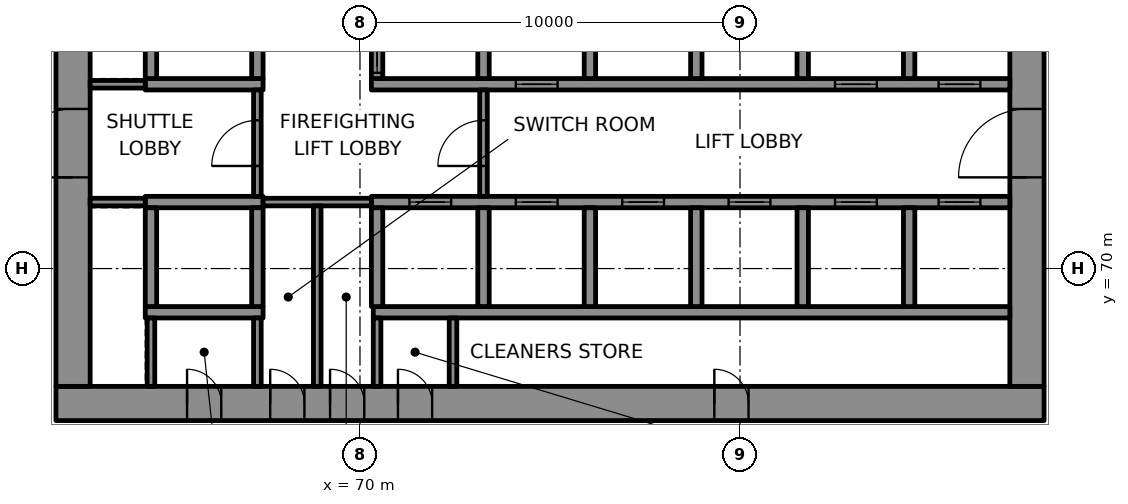
"""IFC4 building model, lengths in metres.
Left out: names, types, materials, properties, quantities, classifications, styles, units other than length and angle.
Written with IfcOpenShell. Run it as: python <this file> out.ifc"""

import sys

from ifc_helpers import new_model, si_unit, direction, frame, frame_2d, origin, place, context, subcontext, project, spatial, rectangle, extrude, element, fill, save


model = new_model("IFC4")
c1 = context("Model", 3, precision=1e-05, world=origin(), true_north=direction((0.0, 1.0)))
c2 = subcontext(c1, "Body", "Model", "MODEL_VIEW")
j1 = project(units=[si_unit("LENGTHUNIT", "METRE"), si_unit("PLANEANGLEUNIT", "RADIAN")], contexts=[c1])
p1 = place(None, origin())
s1 = spatial("IfcSite", under=j1, at=p1, CompositionType="ELEMENT")
p2 = place(p1, origin())
s2 = spatial("IfcBuilding", under=s1, at=p2, CompositionType="ELEMENT")
p3 = place(p2, frame((0.0, 0.0, 73.6)))
s3 = spatial("IfcBuildingStorey", under=s2, at=p3, CompositionType="ELEMENT", Elevation=73.6)
p4 = place(p3, frame((62.0, 66.45, 0.0), z_axis=(0.0, 0.0, 1.0), x_axis=(1.0, 0.0, 0.0)))
e1 = element("IfcWall", 1, at=p4, inside=s3, PredefinedType="SHEAR", context=c2, shape_type="SweptSolid", body=[
    extrude(rectangle(XDim=26.0, YDim=0.9, at=frame_2d((13.0, 0.0))), origin(), (0.0, 0.0, 1.0), 4.0),
])
p5 = place(p4, frame((3.45, 0.0, 0.0)))
e2 = element("IfcOpeningElement", 2, at=p5, cuts=e1, PredefinedType="OPENING", context=c2, shape_type="SweptSolid", body=[
    extrude(rectangle(XDim=0.9, YDim=2.1, at=frame_2d((0.45, 1.05))), frame((0.0, 0.46, 0.0), z_axis=(0.0, -1.0, 0.0), x_axis=(1.0, 0.0, 0.0)), (0.0, 0.0, 1.0), 0.92),
])
p6 = place(p4, frame((5.637, 0.0, 0.0)))
e3 = element("IfcOpeningElement", 3, at=p6, cuts=e1, PredefinedType="OPENING", context=c2, shape_type="SweptSolid", body=[
    extrude(rectangle(XDim=0.9, YDim=2.1, at=frame_2d((0.45, 1.05))), frame((0.0, 0.46, 0.0), z_axis=(0.0, -1.0, 0.0), x_axis=(1.0, 0.0, 0.0)), (0.0, 0.0, 1.0), 0.92),
])
p7 = place(p4, frame((7.212, 0.0, 0.0)))
e4 = element("IfcOpeningElement", 4, at=p7, cuts=e1, PredefinedType="OPENING", context=c2, shape_type="SweptSolid", body=[
    extrude(rectangle(XDim=0.9, YDim=2.1, at=frame_2d((0.45, 1.05))), frame((0.0, 0.46, 0.0), z_axis=(0.0, -1.0, 0.0), x_axis=(1.0, 0.0, 0.0)), (0.0, 0.0, 1.0), 0.92),
])
p8 = place(p4, frame((8.999, 0.0, 0.0)))
e5 = element("IfcOpeningElement", 5, at=p8, cuts=e1, PredefinedType="OPENING", context=c2, shape_type="SweptSolid", body=[
    extrude(rectangle(XDim=0.9, YDim=2.1, at=frame_2d((0.45, 1.05))), frame((0.0, 0.46, 0.0), z_axis=(0.0, -1.0, 0.0), x_axis=(1.0, 0.0, 0.0)), (0.0, 0.0, 1.0), 0.92),
])
p9 = place(p4, frame((17.324, 0.0, 0.0)))
e6 = element("IfcOpeningElement", 6, at=p9, cuts=e1, PredefinedType="OPENING", context=c2, shape_type="SweptSolid", body=[
    extrude(rectangle(XDim=0.9, YDim=2.1, at=frame_2d((0.45, 1.05))), frame((0.0, 0.46, 0.0), z_axis=(0.0, -1.0, 0.0), x_axis=(1.0, 0.0, 0.0)), (0.0, 0.0, 1.0), 0.92),
])
p10 = place(p3, frame((62.45, 66.9, 0.0), z_axis=(0.0, 0.0, 1.0), x_axis=(0.0, 1.0, 0.0)))
e7 = element("IfcWall", 7, at=p10, inside=s3, PredefinedType="SHEAR", context=c2, shape_type="SweptSolid", body=[
    extrude(rectangle(XDim=16.2, YDim=0.9, at=frame_2d((8.1, 0.0))), origin(), (0.0, 0.0, 1.0), 4.0),
])
p11 = place(p10, frame((5.5, 0.0, 0.0)))
e8 = element("IfcOpeningElement", 8, at=p11, cuts=e7, PredefinedType="OPENING", context=c2, shape_type="SweptSolid", body=[
    extrude(rectangle(XDim=1.8, YDim=2.1, at=frame_2d((0.9, 1.05))), frame((0.0, 0.46, 0.0), z_axis=(0.0, -1.0, 0.0), x_axis=(1.0, 0.0, 0.0)), (0.0, 0.0, 1.0), 0.92),
])
p12 = place(p3, frame((87.55, 66.9, 0.0), z_axis=(0.0, 0.0, 1.0), x_axis=(0.0, 1.0, 0.0)))
e9 = element("IfcWall", 9, at=p12, inside=s3, PredefinedType="SHEAR", context=c2, shape_type="SweptSolid", body=[
    extrude(rectangle(XDim=16.2, YDim=0.9, at=frame_2d((8.1, 0.0))), origin(), (0.0, 0.0, 1.0), 4.0),
])
p13 = place(p12, frame((5.5, 0.0, 0.0)))
e10 = element("IfcOpeningElement", 10, at=p13, cuts=e9, PredefinedType="OPENING", context=c2, shape_type="SweptSolid", body=[
    extrude(rectangle(XDim=1.8, YDim=2.1, at=frame_2d((0.9, 1.05))), frame((0.0, 0.46, 0.0), z_axis=(0.0, -1.0, 0.0), x_axis=(1.0, 0.0, 0.0)), (0.0, 0.0, 1.0), 0.92),
])
p14 = place(p12, frame((11.202, 0.0, 0.0)))
e11 = element("IfcOpeningElement", 11, at=p14, cuts=e9, PredefinedType="OPENING", context=c2, shape_type="SweptSolid", body=[
    extrude(rectangle(XDim=0.9, YDim=2.1, at=frame_2d((0.45, 1.05))), frame((0.0, 0.46, 0.0), z_axis=(0.0, -1.0, 0.0), x_axis=(1.0, 0.0, 0.0)), (0.0, 0.0, 1.0), 0.92),
])
p15 = place(p3, frame((64.35, 68.85, 0.0), z_axis=(0.0, 0.0, 1.0), x_axis=(1.0, 0.0, 0.0)))
e12 = element("IfcWall", 12, at=p15, inside=s3, PredefinedType="SHEAR", context=c2, shape_type="SweptSolid", body=[
    extrude(rectangle(XDim=3.1, YDim=0.3, at=frame_2d((1.55, 0.0))), origin(), (0.0, 0.0, 1.0), 4.0),
])
p16 = place(p3, frame((70.35, 68.85, 0.0), z_axis=(0.0, 0.0, 1.0), x_axis=(1.0, 0.0, 0.0)))
e13 = element("IfcWall", 13, at=p16, inside=s3, PredefinedType="SHEAR", context=c2, shape_type="SweptSolid", body=[
    extrude(rectangle(XDim=16.75, YDim=0.3, at=frame_2d((8.375, 0.0))), origin(), (0.0, 0.0, 1.0), 4.0),
])
p17 = place(p3, frame((64.35, 71.75, 0.0), z_axis=(0.0, 0.0, 1.0), x_axis=(1.0, 0.0, 0.0)))
e14 = element("IfcWall", 14, at=p17, inside=s3, PredefinedType="SHEAR", context=c2, shape_type="SweptSolid", body=[
    extrude(rectangle(XDim=3.1, YDim=0.3, at=frame_2d((1.55, 0.0))), origin(), (0.0, 0.0, 1.0), 4.0),
])
p18 = place(p3, frame((70.3, 71.75, 0.0), z_axis=(0.0, 0.0, 1.0), x_axis=(1.0, 0.0, 0.0)))
e15 = element("IfcWall", 15, at=p18, inside=s3, PredefinedType="SHEAR", context=c2, shape_type="SweptSolid", body=[
    extrude(rectangle(XDim=16.8, YDim=0.3, at=frame_2d((8.4, 0.0))), origin(), (0.0, 0.0, 1.0), 4.0),
])
p19 = place(p18, frame((1.0, 0.0, 0.0)))
e16 = element("IfcOpeningElement", 16, at=p19, cuts=e15, PredefinedType="OPENING", context=c2, shape_type="SweptSolid", body=[
    extrude(rectangle(XDim=1.1, YDim=2.1, at=frame_2d((0.55, 1.05))), frame((0.0, 0.16, 0.0), z_axis=(0.0, -1.0, 0.0), x_axis=(1.0, 0.0, 0.0)), (0.0, 0.0, 1.0), 0.32),
])
p20 = place(p18, frame((3.8, 0.0, 0.0)))
e17 = element("IfcOpeningElement", 17, at=p20, cuts=e15, PredefinedType="OPENING", context=c2, shape_type="SweptSolid", body=[
    extrude(rectangle(XDim=1.1, YDim=2.1, at=frame_2d((0.55, 1.05))), frame((0.0, 0.16, 0.0), z_axis=(0.0, -1.0, 0.0), x_axis=(1.0, 0.0, 0.0)), (0.0, 0.0, 1.0), 0.32),
])
p21 = place(p18, frame((6.6, 0.0, 0.0)))
e18 = element("IfcOpeningElement", 18, at=p21, cuts=e15, PredefinedType="OPENING", context=c2, shape_type="SweptSolid", body=[
    extrude(rectangle(XDim=1.1, YDim=2.1, at=frame_2d((0.55, 1.05))), frame((0.0, 0.16, 0.0), z_axis=(0.0, -1.0, 0.0), x_axis=(1.0, 0.0, 0.0)), (0.0, 0.0, 1.0), 0.32),
])
p22 = place(p18, frame((9.4, 0.0, 0.0)))
e19 = element("IfcOpeningElement", 19, at=p22, cuts=e15, PredefinedType="OPENING", context=c2, shape_type="SweptSolid", body=[
    extrude(rectangle(XDim=1.1, YDim=2.1, at=frame_2d((0.55, 1.05))), frame((0.0, 0.16, 0.0), z_axis=(0.0, -1.0, 0.0), x_axis=(1.0, 0.0, 0.0)), (0.0, 0.0, 1.0), 0.32),
])
p23 = place(p18, frame((12.2, 0.0, 0.0)))
e20 = element("IfcOpeningElement", 20, at=p23, cuts=e15, PredefinedType="OPENING", context=c2, shape_type="SweptSolid", body=[
    extrude(rectangle(XDim=1.1, YDim=2.1, at=frame_2d((0.55, 1.05))), frame((0.0, 0.16, 0.0), z_axis=(0.0, -1.0, 0.0), x_axis=(1.0, 0.0, 0.0)), (0.0, 0.0, 1.0), 0.32),
])
p24 = place(p18, frame((14.925, 0.0, 0.0)))
e21 = element("IfcOpeningElement", 21, at=p24, cuts=e15, PredefinedType="OPENING", context=c2, shape_type="SweptSolid", body=[
    extrude(rectangle(XDim=1.1, YDim=2.1, at=frame_2d((0.55, 1.05))), frame((0.0, 0.16, 0.0), z_axis=(0.0, -1.0, 0.0), x_axis=(1.0, 0.0, 0.0)), (0.0, 0.0, 1.0), 0.32),
])
p25 = place(p3, frame((64.35, 74.85, 0.0), z_axis=(0.0, 0.0, 1.0), x_axis=(1.0, 0.0, 0.0)))
e22 = element("IfcWall", 22, at=p25, inside=s3, PredefinedType="SHEAR", context=c2, shape_type="SweptSolid", body=[
    extrude(rectangle(XDim=3.1, YDim=0.3, at=frame_2d((1.55, 0.0))), origin(), (0.0, 0.0, 1.0), 4.0),
])
p26 = place(p3, frame((70.3, 74.85, 0.0), z_axis=(0.0, 0.0, 1.0), x_axis=(1.0, 0.0, 0.0)))
e23 = element("IfcWall", 23, at=p26, inside=s3, PredefinedType="SHEAR", context=c2, shape_type="SweptSolid", body=[
    extrude(rectangle(XDim=16.8, YDim=0.3, at=frame_2d((8.4, 0.0))), origin(), (0.0, 0.0, 1.0), 4.0),
])
p27 = place(p26, frame((3.8, 0.0, 0.0)))
e24 = element("IfcOpeningElement", 24, at=p27, cuts=e23, PredefinedType="OPENING", context=c2, shape_type="SweptSolid", body=[
    extrude(rectangle(XDim=1.1, YDim=2.1, at=frame_2d((0.55, 1.05))), frame((0.0, 0.16, 0.0), z_axis=(0.0, -1.0, 0.0), x_axis=(1.0, 0.0, 0.0)), (0.0, 0.0, 1.0), 0.32),
])
p28 = place(p26, frame((12.2, 0.0, 0.0)))
e25 = element("IfcOpeningElement", 25, at=p28, cuts=e23, PredefinedType="OPENING", context=c2, shape_type="SweptSolid", body=[
    extrude(rectangle(XDim=1.1, YDim=2.1, at=frame_2d((0.55, 1.05))), frame((0.0, 0.16, 0.0), z_axis=(0.0, -1.0, 0.0), x_axis=(1.0, 0.0, 0.0)), (0.0, 0.0, 1.0), 0.32),
])
p29 = place(p26, frame((14.925, 0.0, 0.0)))
e26 = element("IfcOpeningElement", 26, at=p29, cuts=e23, PredefinedType="OPENING", context=c2, shape_type="SweptSolid", body=[
    extrude(rectangle(XDim=1.1, YDim=2.1, at=frame_2d((0.55, 1.05))), frame((0.0, 0.16, 0.0), z_axis=(0.0, -1.0, 0.0), x_axis=(1.0, 0.0, 0.0)), (0.0, 0.0, 1.0), 0.32),
])
for number, where, z_axis, x_axis in (
    (27, (64.5, 69.0, 0.0), (0.0, 0.0, 1.0), (0.0, 1.0, 0.0)),
    (28, (64.5, 75.0, 0.0), (0.0, 0.0, 1.0), (0.0, 1.0, 0.0)),
    (29, (67.3, 69.0, 0.0), (0.0, 0.0, 1.0), (0.0, 1.0, 0.0)),
    (30, (67.3, 75.0, 0.0), (0.0, 0.0, 1.0), (0.0, 1.0, 0.0)),
    (31, (70.45, 69.0, 0.0), (0.0, 0.0, 1.0), (0.0, 1.0, 0.0)),
):
    element("IfcWall", number, at=place(p3, frame(where, z_axis=z_axis, x_axis=x_axis)), inside=s3, PredefinedType="SHEAR", context=c2, shape_type="SweptSolid", body=[
        extrude(rectangle(XDim=2.6, YDim=0.3, at=frame_2d((1.3, 0.0))), origin(), (0.0, 0.0, 1.0), 4.0),
    ])
p30 = place(p3, frame((70.45, 75.0, 0.0), z_axis=(0.0, 0.0, 1.0), x_axis=(0.0, 1.0, 0.0)))
e32 = element("IfcWall", 32, at=p30, inside=s3, PredefinedType="SHEAR", context=c2, shape_type="SweptSolid", body=[
    extrude(rectangle(XDim=2.6, YDim=0.3, at=frame_2d((1.3, 0.0))), origin(), (0.0, 0.0, 1.0), 4.0),
])
p31 = place(p30, frame((0.15, 0.0, 0.0)))
e33 = element("IfcOpeningElement", 33, at=p31, cuts=e32, PredefinedType="OPENING", context=c2, shape_type="SweptSolid", body=[
    extrude(rectangle(XDim=1.1, YDim=2.1, at=frame_2d((0.55, 1.05))), frame((0.0, 0.16, 0.0), z_axis=(0.0, -1.0, 0.0), x_axis=(1.0, 0.0, 0.0)), (0.0, 0.0, 1.0), 0.32),
])
for number, where, z_axis, x_axis in (
    (34, (73.25, 69.0, 0.0), (0.0, 0.0, 1.0), (0.0, 1.0, 0.0)),
    (35, (73.25, 75.0, 0.0), (0.0, 0.0, 1.0), (0.0, 1.0, 0.0)),
    (36, (76.05, 69.0, 0.0), (0.0, 0.0, 1.0), (0.0, 1.0, 0.0)),
    (37, (76.05, 75.0, 0.0), (0.0, 0.0, 1.0), (0.0, 1.0, 0.0)),
    (38, (78.85, 69.0, 0.0), (0.0, 0.0, 1.0), (0.0, 1.0, 0.0)),
    (39, (78.85, 75.0, 0.0), (0.0, 0.0, 1.0), (0.0, 1.0, 0.0)),
    (40, (81.65, 69.0, 0.0), (0.0, 0.0, 1.0), (0.0, 1.0, 0.0)),
    (41, (81.65, 75.0, 0.0), (0.0, 0.0, 1.0), (0.0, 1.0, 0.0)),
    (42, (84.45, 69.0, 0.0), (0.0, 0.0, 1.0), (0.0, 1.0, 0.0)),
    (43, (84.45, 75.0, 0.0), (0.0, 0.0, 1.0), (0.0, 1.0, 0.0)),
):
    element("IfcWall", number, at=place(p3, frame(where, z_axis=z_axis, x_axis=x_axis)), inside=s3, PredefinedType="SHEAR", context=c2, shape_type="SweptSolid", body=[
        extrude(rectangle(XDim=2.6, YDim=0.3, at=frame_2d((1.3, 0.0))), origin(), (0.0, 0.0, 1.0), 4.0),
    ])
p32 = place(p3, frame((62.9, 71.75, 0.0), z_axis=(0.0, 0.0, 1.0), x_axis=(1.0, 0.0, 0.0)))
e44 = element("IfcWall", 44, at=p32, inside=s3, PredefinedType="PARTITIONING", context=c2, shape_type="SweptSolid", body=[
    extrude(rectangle(XDim=1.45, YDim=0.2, at=frame_2d((0.725, 0.0))), origin(), (0.0, 0.0, 1.0), 4.0),
])
p33 = place(p3, frame((67.45, 71.75, 0.0), z_axis=(0.0, 0.0, 1.0), x_axis=(1.0, 0.0, 0.0)))
e45 = element("IfcWall", 45, at=p33, inside=s3, PredefinedType="PARTITIONING", context=c2, shape_type="SweptSolid", body=[
    extrude(rectangle(XDim=2.85, YDim=0.2, at=frame_2d((1.425, 0.0))), origin(), (0.0, 0.0, 1.0), 4.0),
])
p34 = place(p3, frame((62.9, 74.85, 0.0), z_axis=(0.0, 0.0, 1.0), x_axis=(1.0, 0.0, 0.0)))
e46 = element("IfcWall", 46, at=p34, inside=s3, PredefinedType="PARTITIONING", context=c2, shape_type="SweptSolid", body=[
    extrude(rectangle(XDim=1.45, YDim=0.2, at=frame_2d((0.725, 0.0))), origin(), (0.0, 0.0, 1.0), 4.0),
])
for number, where, z_axis, x_axis in (
    (47, (64.5, 66.9, 0.0), (0.0, 0.0, 1.0), (0.0, 1.0, 0.0)),
    (48, (67.3, 66.9, 0.0), (0.0, 0.0, 1.0), (0.0, 1.0, 0.0)),
):
    element("IfcWall", number, at=place(p3, frame(where, z_axis=z_axis, x_axis=x_axis)), inside=s3, PredefinedType="PARTITIONING", context=c2, shape_type="SweptSolid", body=[
        extrude(rectangle(XDim=1.8, YDim=0.2, at=frame_2d((0.9, 0.0))), origin(), (0.0, 0.0, 1.0), 4.0),
    ])
p35 = place(p3, frame((67.3, 71.9, 0.0), z_axis=(0.0, 0.0, 1.0), x_axis=(0.0, 1.0, 0.0)))
e49 = element("IfcWall", 49, at=p35, inside=s3, PredefinedType="PARTITIONING", context=c2, shape_type="SweptSolid", body=[
    extrude(rectangle(XDim=2.8, YDim=0.2, at=frame_2d((1.4, 0.0))), origin(), (0.0, 0.0, 1.0), 4.0),
])
p36 = place(p35, frame((0.8, 0.0, 0.0)))
e50 = element("IfcOpeningElement", 50, at=p36, cuts=e49, PredefinedType="OPENING", context=c2, shape_type="SweptSolid", body=[
    extrude(rectangle(XDim=1.2, YDim=2.1, at=frame_2d((0.6, 1.05))), frame((0.0, 0.11, 0.0), z_axis=(0.0, -1.0, 0.0), x_axis=(1.0, 0.0, 0.0)), (0.0, 0.0, 1.0), 0.22),
])
p37 = place(p3, frame((68.875, 66.9, 0.0), z_axis=(0.0, 0.0, 1.0), x_axis=(0.0, 1.0, 0.0)))
e51 = element("IfcWall", 51, at=p37, inside=s3, PredefinedType="PARTITIONING", context=c2, shape_type="SweptSolid", body=[
    extrude(rectangle(XDim=4.75, YDim=0.2, at=frame_2d((2.375, 0.0))), origin(), (0.0, 0.0, 1.0), 4.0),
])
for number, where, z_axis, x_axis in (
    (52, (70.45, 66.9, 0.0), (0.0, 0.0, 1.0), (0.0, 1.0, 0.0)),
    (53, (72.448, 66.9, 0.0), (0.0, 0.0, 1.0), (0.0, 1.0, 0.0)),
):
    element("IfcWall", number, at=place(p3, frame(where, z_axis=z_axis, x_axis=x_axis)), inside=s3, PredefinedType="PARTITIONING", context=c2, shape_type="SweptSolid", body=[
        extrude(rectangle(XDim=1.8, YDim=0.2, at=frame_2d((0.9, 0.0))), origin(), (0.0, 0.0, 1.0), 4.0),
    ])
p38 = place(p3, frame((73.25, 71.9, 0.0), z_axis=(0.0, 0.0, 1.0), x_axis=(0.0, 1.0, 0.0)))
e54 = element("IfcWall", 54, at=p38, inside=s3, PredefinedType="PARTITIONING", context=c2, shape_type="SweptSolid", body=[
    extrude(rectangle(XDim=2.8, YDim=0.2, at=frame_2d((1.4, 0.0))), origin(), (0.0, 0.0, 1.0), 4.0),
])
p39 = place(p38, frame((0.8, 0.0, 0.0)))
e55 = element("IfcOpeningElement", 55, at=p39, cuts=e54, PredefinedType="OPENING", context=c2, shape_type="SweptSolid", body=[
    extrude(rectangle(XDim=1.2, YDim=2.1, at=frame_2d((0.6, 1.05))), frame((0.0, 0.11, 0.0), z_axis=(0.0, -1.0, 0.0), x_axis=(1.0, 0.0, 0.0)), (0.0, 0.0, 1.0), 0.22),
])
p40 = place(p19, origin())
e56 = element("IfcDoor", 56, at=p40, inside=s3, OperationType="DOUBLE_DOOR_SLIDING", PredefinedType="DOOR", context=c2, shape_type="SweptSolid", body=[
    extrude(rectangle(XDim=1.1, YDim=2.1, at=frame_2d((0.55, 1.05))), frame((0.0, 0.025, 0.0), z_axis=(0.0, -1.0, 0.0), x_axis=(1.0, 0.0, 0.0)), (0.0, 0.0, 1.0), 0.05),
])
fill(e16, e56)
p41 = place(p20, origin())
e57 = element("IfcDoor", 57, at=p41, inside=s3, OperationType="DOUBLE_DOOR_SLIDING", PredefinedType="DOOR", context=c2, shape_type="SweptSolid", body=[
    extrude(rectangle(XDim=1.1, YDim=2.1, at=frame_2d((0.55, 1.05))), frame((0.0, 0.025, 0.0), z_axis=(0.0, -1.0, 0.0), x_axis=(1.0, 0.0, 0.0)), (0.0, 0.0, 1.0), 0.05),
])
fill(e17, e57)
p42 = place(p21, origin())
e58 = element("IfcDoor", 58, at=p42, inside=s3, OperationType="DOUBLE_DOOR_SLIDING", PredefinedType="DOOR", context=c2, shape_type="SweptSolid", body=[
    extrude(rectangle(XDim=1.1, YDim=2.1, at=frame_2d((0.55, 1.05))), frame((0.0, 0.025, 0.0), z_axis=(0.0, -1.0, 0.0), x_axis=(1.0, 0.0, 0.0)), (0.0, 0.0, 1.0), 0.05),
])
fill(e18, e58)
p43 = place(p22, origin())
e59 = element("IfcDoor", 59, at=p43, inside=s3, OperationType="DOUBLE_DOOR_SLIDING", PredefinedType="DOOR", context=c2, shape_type="SweptSolid", body=[
    extrude(rectangle(XDim=1.1, YDim=2.1, at=frame_2d((0.55, 1.05))), frame((0.0, 0.025, 0.0), z_axis=(0.0, -1.0, 0.0), x_axis=(1.0, 0.0, 0.0)), (0.0, 0.0, 1.0), 0.05),
])
fill(e19, e59)
p44 = place(p23, origin())
e60 = element("IfcDoor", 60, at=p44, inside=s3, OperationType="DOUBLE_DOOR_SLIDING", PredefinedType="DOOR", context=c2, shape_type="SweptSolid", body=[
    extrude(rectangle(XDim=1.1, YDim=2.1, at=frame_2d((0.55, 1.05))), frame((0.0, 0.025, 0.0), z_axis=(0.0, -1.0, 0.0), x_axis=(1.0, 0.0, 0.0)), (0.0, 0.0, 1.0), 0.05),
])
fill(e20, e60)
p45 = place(p24, origin())
e61 = element("IfcDoor", 61, at=p45, inside=s3, OperationType="DOUBLE_DOOR_SLIDING", PredefinedType="DOOR", context=c2, shape_type="SweptSolid", body=[
    extrude(rectangle(XDim=1.1, YDim=2.1, at=frame_2d((0.55, 1.05))), frame((0.0, 0.025, 0.0), z_axis=(0.0, -1.0, 0.0), x_axis=(1.0, 0.0, 0.0)), (0.0, 0.0, 1.0), 0.05),
])
fill(e21, e61)
p46 = place(p31, origin())
e62 = element("IfcDoor", 62, at=p46, inside=s3, OperationType="DOUBLE_DOOR_SLIDING", PredefinedType="DOOR", context=c2, shape_type="SweptSolid", body=[
    extrude(rectangle(XDim=1.1, YDim=2.1, at=frame_2d((0.55, 1.05))), frame((0.0, 0.025, 0.0), z_axis=(0.0, -1.0, 0.0), x_axis=(1.0, 0.0, 0.0)), (0.0, 0.0, 1.0), 0.05),
])
fill(e33, e62)
p47 = place(p27, origin())
e63 = element("IfcDoor", 63, at=p47, inside=s3, OperationType="DOUBLE_DOOR_SLIDING", PredefinedType="DOOR", context=c2, shape_type="SweptSolid", body=[
    extrude(rectangle(XDim=1.1, YDim=2.1, at=frame_2d((0.55, 1.05))), frame((0.0, 0.025, 0.0), z_axis=(0.0, -1.0, 0.0), x_axis=(1.0, 0.0, 0.0)), (0.0, 0.0, 1.0), 0.05),
])
fill(e24, e63)
p48 = place(p28, origin())
e64 = element("IfcDoor", 64, at=p48, inside=s3, OperationType="DOUBLE_DOOR_SLIDING", PredefinedType="DOOR", context=c2, shape_type="SweptSolid", body=[
    extrude(rectangle(XDim=1.1, YDim=2.1, at=frame_2d((0.55, 1.05))), frame((0.0, 0.025, 0.0), z_axis=(0.0, -1.0, 0.0), x_axis=(1.0, 0.0, 0.0)), (0.0, 0.0, 1.0), 0.05),
])
fill(e25, e64)
p49 = place(p29, origin())
e65 = element("IfcDoor", 65, at=p49, inside=s3, OperationType="DOUBLE_DOOR_SLIDING", PredefinedType="DOOR", context=c2, shape_type="SweptSolid", body=[
    extrude(rectangle(XDim=1.1, YDim=2.1, at=frame_2d((0.55, 1.05))), frame((0.0, 0.025, 0.0), z_axis=(0.0, -1.0, 0.0), x_axis=(1.0, 0.0, 0.0)), (0.0, 0.0, 1.0), 0.05),
])
fill(e26, e65)
p50 = place(p39, origin())
e66 = element("IfcDoor", 66, at=p50, inside=s3, OperationType="SINGLE_SWING_LEFT", PredefinedType="DOOR", context=c2, shape_type="SweptSolid", body=[
    extrude(rectangle(XDim=1.2, YDim=2.1, at=frame_2d((0.6, 1.05))), frame((0.0, 0.025, 0.0), z_axis=(0.0, -1.0, 0.0), x_axis=(1.0, 0.0, 0.0)), (0.0, 0.0, 1.0), 0.05),
])
fill(e55, e66)
p51 = place(p36, origin())
e67 = element("IfcDoor", 67, at=p51, inside=s3, OperationType="SINGLE_SWING_RIGHT", PredefinedType="DOOR", context=c2, shape_type="SweptSolid", body=[
    extrude(rectangle(XDim=1.2, YDim=2.1, at=frame_2d((0.6, 1.05))), frame((0.0, 0.025, 0.0), z_axis=(0.0, -1.0, 0.0), x_axis=(1.0, 0.0, 0.0)), (0.0, 0.0, 1.0), 0.05),
])
fill(e50, e67)
p52 = place(p11, origin())
e68 = element("IfcDoor", 68, at=p52, inside=s3, OperationType="SINGLE_SWING_LEFT", PredefinedType="DOOR", context=c2, shape_type="SweptSolid", body=[
    extrude(rectangle(XDim=1.8, YDim=2.1, at=frame_2d((0.9, 1.05))), frame((0.0, 0.17, 0.0), z_axis=(0.0, -1.0, 0.0), x_axis=(1.0, 0.0, 0.0)), (0.0, 0.0, 1.0), 0.34),
])
fill(e8, e68)
p53 = place(p13, origin())
e69 = element("IfcDoor", 69, at=p53, inside=s3, OperationType="SINGLE_SWING_RIGHT", PredefinedType="DOOR", context=c2, shape_type="SweptSolid", body=[
    extrude(rectangle(XDim=1.8, YDim=2.1, at=frame_2d((0.9, 1.05))), frame((0.0, 0.17, 0.0), z_axis=(0.0, -1.0, 0.0), x_axis=(1.0, 0.0, 0.0)), (0.0, 0.0, 1.0), 0.34),
])
fill(e10, e69)
p54 = place(p5, origin())
e70 = element("IfcDoor", 70, at=p54, inside=s3, OperationType="SINGLE_SWING_LEFT", PredefinedType="DOOR", context=c2, shape_type="SweptSolid", body=[
    extrude(rectangle(XDim=0.9, YDim=2.1, at=frame_2d((0.45, 1.05))), frame((0.0, 0.17, 0.0), z_axis=(0.0, -1.0, 0.0), x_axis=(1.0, 0.0, 0.0)), (0.0, 0.0, 1.0), 0.34),
])
fill(e2, e70)
p55 = place(p6, origin())
e71 = element("IfcDoor", 71, at=p55, inside=s3, OperationType="SINGLE_SWING_RIGHT", PredefinedType="DOOR", context=c2, shape_type="SweptSolid", body=[
    extrude(rectangle(XDim=0.9, YDim=2.1, at=frame_2d((0.45, 1.05))), frame((0.0, 0.17, 0.0), z_axis=(0.0, -1.0, 0.0), x_axis=(1.0, 0.0, 0.0)), (0.0, 0.0, 1.0), 0.34),
])
fill(e3, e71)
p56 = place(p7, origin())
e72 = element("IfcDoor", 72, at=p56, inside=s3, OperationType="SINGLE_SWING_LEFT", PredefinedType="DOOR", context=c2, shape_type="SweptSolid", body=[
    extrude(rectangle(XDim=0.9, YDim=2.1, at=frame_2d((0.45, 1.05))), frame((0.0, 0.17, 0.0), z_axis=(0.0, -1.0, 0.0), x_axis=(1.0, 0.0, 0.0)), (0.0, 0.0, 1.0), 0.34),
])
fill(e4, e72)
p57 = place(p8, origin())
e73 = element("IfcDoor", 73, at=p57, inside=s3, OperationType="SINGLE_SWING_RIGHT", PredefinedType="DOOR", context=c2, shape_type="SweptSolid", body=[
    extrude(rectangle(XDim=0.9, YDim=2.1, at=frame_2d((0.45, 1.05))), frame((0.0, 0.17, 0.0), z_axis=(0.0, -1.0, 0.0), x_axis=(1.0, 0.0, 0.0)), (0.0, 0.0, 1.0), 0.34),
])
fill(e5, e73)
p58 = place(p9, origin())
e74 = element("IfcDoor", 74, at=p58, inside=s3, OperationType="SINGLE_SWING_LEFT", PredefinedType="DOOR", context=c2, shape_type="SweptSolid", body=[
    extrude(rectangle(XDim=0.9, YDim=2.1, at=frame_2d((0.45, 1.05))), frame((0.0, 0.17, 0.0), z_axis=(0.0, -1.0, 0.0), x_axis=(1.0, 0.0, 0.0)), (0.0, 0.0, 1.0), 0.34),
])
fill(e6, e74)
save(model, sys.argv[1])
